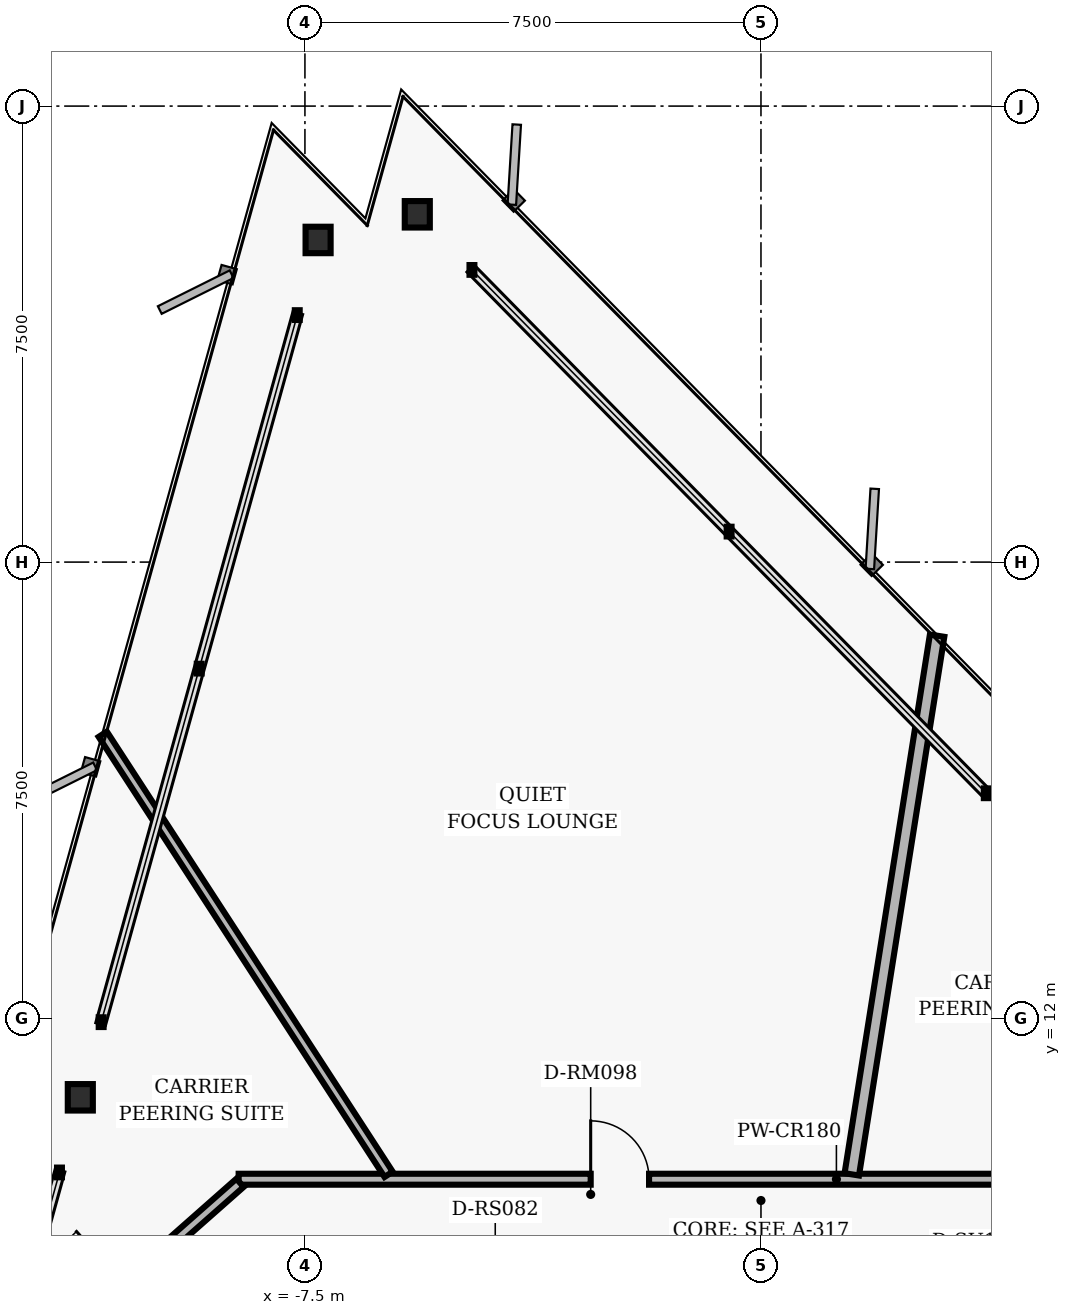
"""IFC4 building model, lengths in metres.
Left out: names, types, materials, properties, quantities, classifications, styles, units other than length and angle.
Written with IfcOpenShell. Run it as: python <this file> out.ifc"""

import sys

from ifc_helpers import new_model, si_unit, direction, frame, frame_2d, origin, origin_2d, place, context, subcontext, project, spatial, rectangle, i_section, extrude, element, fill, save


model = new_model("IFC4")
c1 = context("Model", 3, precision=1e-05, world=origin(), true_north=direction((0.0, 1.0)))
c2 = subcontext(c1, "Body", "Model", "MODEL_VIEW")
j1 = project(units=[si_unit("LENGTHUNIT", "METRE"), si_unit("PLANEANGLEUNIT", "RADIAN")], contexts=[c1])
p1 = place(None, origin())
s1 = spatial("IfcSite", under=j1, at=p1, CompositionType="ELEMENT")
p2 = place(p1, origin())
s2 = spatial("IfcBuilding", under=s1, at=p2, CompositionType="ELEMENT")
p3 = place(p2, frame((0.0, 0.0, 91.68)))
s3 = spatial("IfcBuildingStorey", under=s2, at=p3, CompositionType="ELEMENT", Elevation=91.68)
for number, where, z_axis, x_axis in (
    (1, (-5.652, 25.22, 0.0), (0.0, 0.0, 1.0), (1.0, 0.0, 0.0)),
    (2, (-7.283, 24.798, 0.0), (0.0, 0.0, 1.0), (1.0, 0.0, 0.0)),
    (3, (-11.194, 10.697, 0.0), (0.0, 0.0, 1.0), (1.0, 0.0, 0.0)),
):
    element("IfcColumn", number, at=place(p3, frame(where, z_axis=z_axis, x_axis=x_axis)), inside=s3, PredefinedType="COLUMN", context=c2, shape_type="SweptSolid", body=[
        extrude(i_section(OverallWidth=0.412, OverallDepth=0.435, WebThickness=0.036, FlangeThickness=0.057, FilletRadius=0.022, at=origin_2d()), origin(), (0.0, 0.0, 1.0), 3.04),
    ])
p4 = place(p3, frame((-8.59, 9.35, 0.0), z_axis=(0.0, 0.0, 1.0), x_axis=(1.0, 0.0, 0.0)))
e4 = element("IfcWall", 4, at=p4, inside=s3, PredefinedType="PARTITIONING", context=c2, shape_type="SweptSolid", body=[
    extrude(rectangle(XDim=17.18, YDim=0.18, at=frame_2d((8.59, 0.0))), origin(), (0.0, 0.0, 1.0), 2.277),
])
p5 = place(p4, frame((12.912, 0.0, 0.0)))
e5 = element("IfcOpeningElement", 5, at=p5, cuts=e4, PredefinedType="OPENING", context=c2, shape_type="SweptSolid", body=[
    extrude(rectangle(XDim=1.18, YDim=2.02, at=frame_2d((0.59, 1.01))), frame((0.0, 0.1, 0.0), z_axis=(0.0, -1.0, 0.0), x_axis=(1.0, 0.0, 0.0)), (0.0, 0.0, 1.0), 0.2),
])
p6 = place(p4, frame((5.79, 0.0, 0.0)))
e6 = element("IfcOpeningElement", 6, at=p6, cuts=e4, PredefinedType="OPENING", context=c2, shape_type="SweptSolid", body=[
    extrude(rectangle(XDim=0.96, YDim=2.02, at=frame_2d((0.48, 1.01))), frame((0.0, 0.1, 0.0), z_axis=(0.0, -1.0, 0.0), x_axis=(1.0, 0.0, 0.0)), (0.0, 0.0, 1.0), 0.2),
])
p7 = place(p3, frame((-13.268, 5.14, 0.0), z_axis=(0.0, 0.0, 1.0), x_axis=(0.749626463267, 0.66186113768, 0.0)))
e7 = element("IfcWall", 7, at=p7, inside=s3, PredefinedType="PARTITIONING", context=c2, shape_type="SweptSolid", body=[
    extrude(rectangle(XDim=6.27, YDim=0.18, at=frame_2d((3.135, 0.0))), origin(), (0.0, 0.0, 1.0), 2.763),
])
p8 = place(p7, frame((2.545, 0.0, 0.0)))
e8 = element("IfcOpeningElement", 8, at=p8, cuts=e7, PredefinedType="OPENING", context=c2, shape_type="SweptSolid", body=[
    extrude(rectangle(XDim=1.18, YDim=2.02, at=frame_2d((0.59, 1.01))), frame((0.0, 0.1, 0.0), z_axis=(0.0, -1.0, 0.0), x_axis=(1.0, 0.0, 0.0)), (0.0, 0.0, 1.0), 0.2),
])
p9 = place(p3, frame((1.494, 9.43, 0.0), z_axis=(0.0, 0.0, 1.0), x_axis=(0.156413985488, 0.98769158402, 0.0)))
e9 = element("IfcWall", 9, at=p9, inside=s3, PredefinedType="PARTITIONING", context=c2, shape_type="SweptSolid", body=[
    extrude(rectangle(XDim=8.97, YDim=0.24, at=frame_2d((4.485, 0.0))), origin(), (0.0, 0.0, 1.0), 2.763),
])
p10 = place(p3, frame((-6.124, 9.43, 0.0), z_axis=(0.0, 0.0, 1.0), x_axis=(-0.544640325453, 0.838669729924, 0.0)))
e10 = element("IfcWall", 10, at=p10, inside=s3, PredefinedType="PARTITIONING", context=c2, shape_type="SweptSolid", body=[
    extrude(rectangle(XDim=8.631, YDim=0.16, at=frame_2d((4.316, 0.0))), origin(), (0.0, 0.0, 1.0), 2.763),
])
p11 = place(p6, origin())
e11 = element("IfcDoor", 11, at=p11, inside=s3, OperationType="SINGLE_SWING_LEFT", PredefinedType="DOOR", context=c2, shape_type="SweptSolid", body=[
    extrude(rectangle(XDim=0.96, YDim=2.02, at=frame_2d((0.48, 1.01))), frame((0.0, 0.025, 0.0), z_axis=(0.0, -1.0, 0.0), x_axis=(1.0, 0.0, 0.0)), (0.0, 0.0, 1.0), 0.05),
])
fill(e6, e11)
save(model, sys.argv[1])
